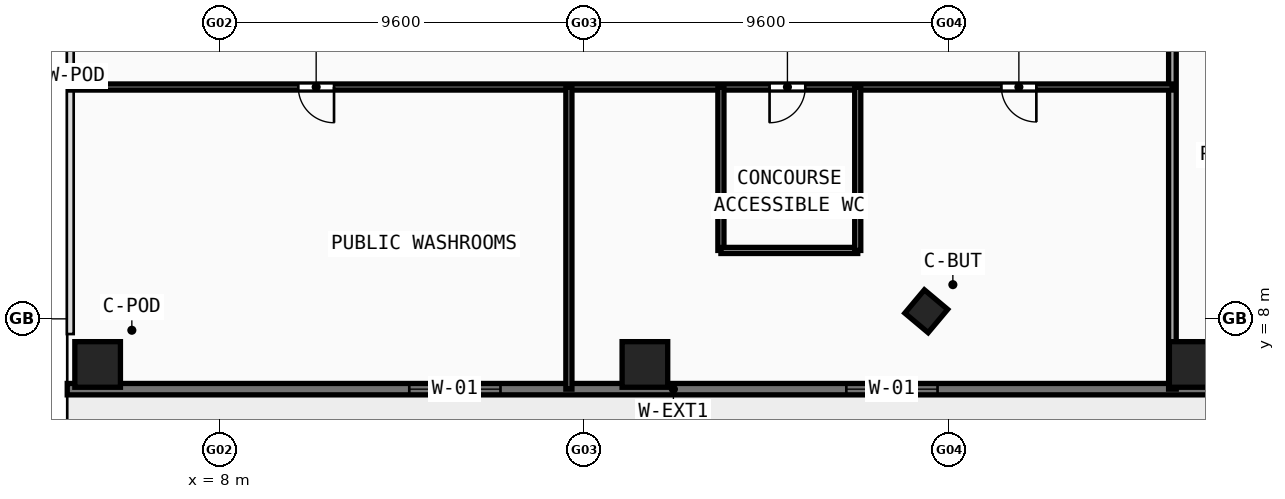
"""IFC4 building model, lengths in metres.
Left out: names, types, materials, properties, quantities, classifications, styles, units other than length and angle.
Written with IfcOpenShell. Run it as: python <this file> out.ifc"""

import sys

from ifc_helpers import new_model, si_unit, direction, frame, frame_2d, origin, origin_with_axes, origin_2d, place, context, subcontext, project, spatial, rectangle, hollow_rectangle, extrude, source, transform, mapped, element, fill, save


model = new_model("IFC4")
c1 = context("Model", 3, precision=1e-05, world=origin(), true_north=direction((0.0, 1.0)))
c2 = subcontext(c1, "Body", "Model", "MODEL_VIEW")
j1 = project(units=[si_unit("LENGTHUNIT", "METRE"), si_unit("PLANEANGLEUNIT", "RADIAN")], contexts=[c1])
p1 = place(None, origin())
s1 = spatial("IfcSite", under=j1, at=p1, CompositionType="ELEMENT")
p2 = place(p1, origin())
s2 = spatial("IfcBuilding", under=s1, at=p2, CompositionType="ELEMENT")
p3 = place(p2, origin())
s3 = spatial("IfcBuildingStorey", under=s2, at=p3, CompositionType="ELEMENT", Elevation=0.0)
m1 = source(origin(), c2, "Body", "SweptSolid", [
    extrude(hollow_rectangle(XDim=1.2, YDim=1.2, WallThickness=0.05, at=origin_2d()), origin(), (0.0, 0.0, 1.0), 4.8),
])
for number, where, z_axis, x_axis in (
    (1, (4.8, 6.8, -0.28), (0.0, 0.0, 1.0), (1.0, 0.0, 0.0)),
    (2, (19.2, 6.8, -0.28), (0.0, 0.0, 1.0), (1.0, 0.0, 0.0)),
    (3, (33.6, 6.8, -0.28), (0.0, 0.0, 1.0), (1.0, 0.0, 0.0)),
):
    element("IfcColumn", number, at=place(p3, frame(where, z_axis=z_axis, x_axis=x_axis)), inside=s3, PredefinedType="COLUMN", context=c2, shape_type="MappedRepresentation", body=[
        mapped(m1, transform((0.0, 0.0, 0.0), scale=1.0)),
    ])
m2 = source(origin(), c2, "Body", "SweptSolid", [
    extrude(hollow_rectangle(XDim=0.8, YDim=0.8, WallThickness=0.032, at=origin_2d()), origin(), (0.0, 0.0, 1.0), 4.8),
])
p4 = place(p3, frame((26.603, 8.2, -0.28), z_axis=(0.0, 0.0, 1.0), x_axis=(0.766044443119, -0.642787609687, 0.0)))
e4 = element("IfcColumn", 4, at=p4, inside=s3, PredefinedType="COLUMN", context=c2, shape_type="MappedRepresentation", body=[
    mapped(m2, transform((0.0, 0.0, 0.0), scale=1.0)),
])
p5 = place(p3, frame((4.0, 6.15, 0.0), z_axis=(0.0, 0.0, 1.0), x_axis=(1.0, 0.0, 0.0)))
e5 = element("IfcWall", 5, at=p5, inside=s3, PredefinedType="STANDARD", context=c2, shape_type="SweptSolid", body=[
    extrude(rectangle(XDim=88.0, YDim=0.3, at=frame_2d((44.0, 0.0))), origin(), (0.0, 0.0, 1.0), 4.52),
])
p6 = place(p5, frame((32.05, 0.0, 0.0)))
e6 = element("IfcOpeningElement", 6, at=p6, cuts=e5, PredefinedType="OPENING", context=c2, shape_type="SweptSolid", body=[
    extrude(rectangle(XDim=2.4, YDim=2.2, at=frame_2d((1.2, 1.1))), frame((0.0, 0.16, 0.0), z_axis=(0.0, -1.0, 0.0), x_axis=(1.0, 0.0, 0.0)), (0.0, 0.0, 1.0), 0.32),
])
p7 = place(p5, frame((53.55, 0.0, 0.0)))
e7 = element("IfcOpeningElement", 7, at=p7, cuts=e5, PredefinedType="OPENING", context=c2, shape_type="SweptSolid", body=[
    extrude(rectangle(XDim=2.4, YDim=2.2, at=frame_2d((1.2, 1.1))), frame((0.0, 0.16, 0.0), z_axis=(0.0, -1.0, 0.0), x_axis=(1.0, 0.0, 0.0)), (0.0, 0.0, 1.0), 0.32),
])
p8 = place(p5, frame((68.0, 0.0, 0.0)))
e8 = element("IfcOpeningElement", 8, at=p8, cuts=e5, PredefinedType="OPENING", context=c2, shape_type="SweptSolid", body=[
    extrude(rectangle(XDim=2.4, YDim=2.2, at=frame_2d((1.2, 1.1))), frame((0.0, 0.16, 0.0), z_axis=(0.0, -1.0, 0.0), x_axis=(1.0, 0.0, 0.0)), (0.0, 0.0, 1.0), 0.32),
])
p9 = place(p5, frame((78.0, 0.0, 0.0)))
e9 = element("IfcOpeningElement", 9, at=p9, cuts=e5, PredefinedType="OPENING", context=c2, shape_type="SweptSolid", body=[
    extrude(rectangle(XDim=2.4, YDim=2.2, at=frame_2d((1.2, 1.1))), frame((0.0, 0.16, 0.0), z_axis=(0.0, -1.0, 0.0), x_axis=(1.0, 0.0, 0.0)), (0.0, 0.0, 1.0), 0.32),
])
p10 = place(p5, frame((9.0, 0.0, 0.9)))
e10 = element("IfcOpeningElement", 10, at=p10, cuts=e5, PredefinedType="OPENING", context=c2, shape_type="SweptSolid", body=[
    extrude(rectangle(XDim=2.4, YDim=1.8, at=frame_2d((1.2, 0.9))), frame((0.0, 0.16, 0.0), z_axis=(0.0, -1.0, 0.0), x_axis=(1.0, 0.0, 0.0)), (0.0, 0.0, 1.0), 0.32),
])
p11 = place(p5, frame((20.5, 0.0, 0.9)))
e11 = element("IfcOpeningElement", 11, at=p11, cuts=e5, PredefinedType="OPENING", context=c2, shape_type="SweptSolid", body=[
    extrude(rectangle(XDim=2.4, YDim=1.8, at=frame_2d((1.2, 0.9))), frame((0.0, 0.16, 0.0), z_axis=(0.0, -1.0, 0.0), x_axis=(1.0, 0.0, 0.0)), (0.0, 0.0, 1.0), 0.32),
])
p12 = place(p5, frame((39.0, 0.0, 0.9)))
e12 = element("IfcOpeningElement", 12, at=p12, cuts=e5, PredefinedType="OPENING", context=c2, shape_type="SweptSolid", body=[
    extrude(rectangle(XDim=2.4, YDim=1.8, at=frame_2d((1.2, 0.9))), frame((0.0, 0.16, 0.0), z_axis=(0.0, -1.0, 0.0), x_axis=(1.0, 0.0, 0.0)), (0.0, 0.0, 1.0), 0.32),
])
p13 = place(p5, frame((48.0, 0.0, 0.9)))
e13 = element("IfcOpeningElement", 13, at=p13, cuts=e5, PredefinedType="OPENING", context=c2, shape_type="SweptSolid", body=[
    extrude(rectangle(XDim=2.4, YDim=1.8, at=frame_2d((1.2, 0.9))), frame((0.0, 0.16, 0.0), z_axis=(0.0, -1.0, 0.0), x_axis=(1.0, 0.0, 0.0)), (0.0, 0.0, 1.0), 0.32),
])
p14 = place(p5, frame((61.5, 0.0, 0.9)))
e14 = element("IfcOpeningElement", 14, at=p14, cuts=e5, PredefinedType="OPENING", context=c2, shape_type="SweptSolid", body=[
    extrude(rectangle(XDim=2.4, YDim=1.8, at=frame_2d((1.2, 0.9))), frame((0.0, 0.16, 0.0), z_axis=(0.0, -1.0, 0.0), x_axis=(1.0, 0.0, 0.0)), (0.0, 0.0, 1.0), 0.32),
])
p15 = place(p3, frame((33.08, 6.15, 0.0), z_axis=(0.0, 0.0, 1.0), x_axis=(0.0, 1.0, 0.0)))
e15 = element("IfcWall", 15, at=p15, inside=s3, PredefinedType="SOLIDWALL", context=c2, shape_type="SweptSolid", body=[
    extrude(rectangle(XDim=35.7, YDim=0.2, at=frame_2d((17.85, 0.0))), origin(), (0.0, 0.0, 1.0), 3.62),
])
p16 = place(p3, frame((4.08, 14.1, 0.0), z_axis=(0.0, 0.0, 1.0), x_axis=(1.0, 0.0, 0.0)))
e16 = element("IfcWall", 16, at=p16, inside=s3, PredefinedType="PARTITIONING", context=c2, shape_type="SweptSolid", body=[
    extrude(rectangle(XDim=29.0, YDim=0.16, at=frame_2d((14.5, 0.0))), origin(), (0.0, 0.0, 1.0), 3.62),
])
p17 = place(p16, frame((6.0, 0.0, 0.0)))
e17 = element("IfcOpeningElement", 17, at=p17, cuts=e16, PredefinedType="OPENING", context=c2, shape_type="SweptSolid", body=[
    extrude(rectangle(XDim=0.94, YDim=2.1, at=frame_2d((0.47, 1.05))), frame((0.0, 0.09, 0.0), z_axis=(0.0, -1.0, 0.0), x_axis=(1.0, 0.0, 0.0)), (0.0, 0.0, 1.0), 0.18),
])
p18 = place(p16, frame((18.4, 0.0, 0.0)))
e18 = element("IfcOpeningElement", 18, at=p18, cuts=e16, PredefinedType="OPENING", context=c2, shape_type="SweptSolid", body=[
    extrude(rectangle(XDim=0.94, YDim=2.1, at=frame_2d((0.47, 1.05))), frame((0.0, 0.09, 0.0), z_axis=(0.0, -1.0, 0.0), x_axis=(1.0, 0.0, 0.0)), (0.0, 0.0, 1.0), 0.18),
])
p19 = place(p16, frame((24.5, 0.0, 0.0)))
e19 = element("IfcOpeningElement", 19, at=p19, cuts=e16, PredefinedType="OPENING", context=c2, shape_type="SweptSolid", body=[
    extrude(rectangle(XDim=0.92, YDim=2.1, at=frame_2d((0.46, 1.05))), frame((0.0, 0.09, 0.0), z_axis=(0.0, -1.0, 0.0), x_axis=(1.0, 0.0, 0.0)), (0.0, 0.0, 1.0), 0.18),
])
p20 = place(p3, frame((17.2, 6.15, 0.0), z_axis=(0.0, 0.0, 1.0), x_axis=(0.0, 1.0, 0.0)))
e20 = element("IfcWall", 20, at=p20, inside=s3, PredefinedType="PARTITIONING", context=c2, shape_type="SweptSolid", body=[
    extrude(rectangle(XDim=7.95, YDim=0.16, at=frame_2d((3.975, 0.0))), origin(), (0.0, 0.0, 1.0), 3.72),
])
p21 = place(p3, frame((21.2, 9.8, 0.0), z_axis=(0.0, 0.0, 1.0), x_axis=(0.0, 1.0, 0.0)))
e21 = element("IfcWall", 21, at=p21, inside=s3, PredefinedType="PARTITIONING", context=c2, shape_type="SweptSolid", body=[
    extrude(rectangle(XDim=4.3, YDim=0.16, at=frame_2d((2.15, 0.0))), origin(), (0.0, 0.0, 1.0), 4.52),
])
p22 = place(p3, frame((21.2, 9.8, 0.0), z_axis=(0.0, 0.0, 1.0), x_axis=(1.0, 0.0, 0.0)))
e22 = element("IfcWall", 22, at=p22, inside=s3, PredefinedType="PARTITIONING", context=c2, shape_type="SweptSolid", body=[
    extrude(rectangle(XDim=3.6, YDim=0.16, at=frame_2d((1.8, 0.0))), origin(), (0.0, 0.0, 1.0), 4.52),
])
p23 = place(p3, frame((24.8, 9.8, 0.0), z_axis=(0.0, 0.0, 1.0), x_axis=(0.0, 1.0, 0.0)))
e23 = element("IfcWall", 23, at=p23, inside=s3, PredefinedType="PARTITIONING", context=c2, shape_type="SweptSolid", body=[
    extrude(rectangle(XDim=4.3, YDim=0.16, at=frame_2d((2.15, 0.0))), origin(), (0.0, 0.0, 1.0), 4.52),
])
m3 = source(origin(), c2, "Body", "SweptSolid", [
    extrude(rectangle(XDim=2.4, YDim=1.8, at=frame_2d((1.2, 0.9))), frame((0.0, 0.03, 0.0), z_axis=(0.0, -1.0, 0.0), x_axis=(1.0, 0.0, 0.0)), (0.0, 0.0, 1.0), 0.06),
])
p24 = place(p10, origin_with_axes())
e24 = element("IfcWindow", 24, at=p24, inside=s3, PartitioningType="SINGLE_PANEL", PredefinedType="WINDOW", context=c2, shape_type="MappedRepresentation", body=[
    mapped(m3, transform((0.0, 0.0, 0.0), scale=1.0)),
])
fill(e10, e24)
p25 = place(p11, origin_with_axes())
e25 = element("IfcWindow", 25, at=p25, inside=s3, PartitioningType="SINGLE_PANEL", PredefinedType="WINDOW", context=c2, shape_type="MappedRepresentation", body=[
    mapped(m3, transform((0.0, 0.0, 0.0), scale=1.0)),
])
fill(e11, e25)
m4 = source(origin(), c2, "Body", "SweptSolid", [
    extrude(rectangle(XDim=0.94, YDim=2.1, at=frame_2d((0.47, 1.05))), frame((0.0, 0.025, 0.0), z_axis=(0.0, -1.0, 0.0), x_axis=(1.0, 0.0, 0.0)), (0.0, 0.0, 1.0), 0.05),
])
p26 = place(p17, frame((0.94, 0.0, 0.0), z_axis=(0.0, 0.0, 1.0), x_axis=(-1.0, 0.0, 0.0)))
e26 = element("IfcDoor", 26, at=p26, inside=s3, OperationType="SINGLE_SWING_LEFT", PredefinedType="DOOR", context=c2, shape_type="MappedRepresentation", body=[
    mapped(m4, transform((0.0, 0.0, 0.0), scale=1.0)),
])
fill(e17, e26)
p27 = place(p18, frame((0.94, 0.0, 0.0), z_axis=(0.0, 0.0, 1.0), x_axis=(-1.0, 0.0, 0.0)))
e27 = element("IfcDoor", 27, at=p27, inside=s3, OperationType="SINGLE_SWING_RIGHT", PredefinedType="DOOR", context=c2, shape_type="MappedRepresentation", body=[
    mapped(m4, transform((0.0, 0.0, 0.0), scale=1.0)),
])
fill(e18, e27)
m5 = source(origin(), c2, "Body", "SweptSolid", [
    extrude(rectangle(XDim=0.92, YDim=2.1, at=frame_2d((0.46, 1.05))), frame((0.0, 0.025, 0.0), z_axis=(0.0, -1.0, 0.0), x_axis=(1.0, 0.0, 0.0)), (0.0, 0.0, 1.0), 0.05),
])
p28 = place(p19, frame((0.92, 0.0, 0.0), z_axis=(0.0, 0.0, 1.0), x_axis=(-1.0, 0.0, 0.0)))
e28 = element("IfcDoor", 28, at=p28, inside=s3, OperationType="SINGLE_SWING_LEFT", PredefinedType="DOOR", context=c2, shape_type="MappedRepresentation", body=[
    mapped(m5, transform((0.0, 0.0, 0.0), scale=1.0)),
])
fill(e19, e28)
save(model, sys.argv[1])
